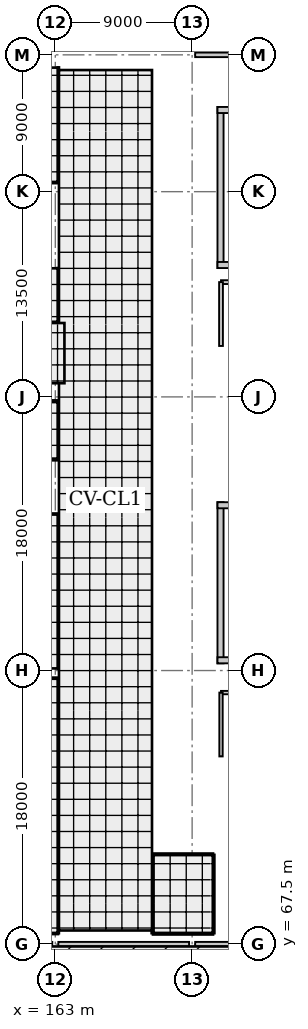
"""IFC4 building model, lengths in metres.
Left out: names, types, materials, properties, quantities, classifications, styles, units other than length and angle.
Written with IfcOpenShell. Run it as: python <this file> out.ifc"""

import sys

from ifc_helpers import new_model, si_unit, direction, frame, frame_2d, origin, origin_2d, place, context, subcontext, project, spatial, rectangle, i_section, extrude, element, fill, save


model = new_model("IFC4")
c1 = context("Model", 3, precision=1e-05, world=origin(), true_north=direction((0.0, 1.0)))
c2 = subcontext(c1, "Body", "Model", "MODEL_VIEW")
j1 = project(units=[si_unit("LENGTHUNIT", "METRE"), si_unit("PLANEANGLEUNIT", "RADIAN")], contexts=[c1])
p1 = place(None, origin())
s1 = spatial("IfcSite", under=j1, at=p1, CompositionType="ELEMENT")
p2 = place(p1, origin())
s2 = spatial("IfcBuilding", under=s1, at=p2, CompositionType="ELEMENT")
p3 = place(p2, frame((0.0, 0.0, 10.8)))
s3 = spatial("IfcBuildingStorey", under=s2, at=p3, CompositionType="ELEMENT", Elevation=10.8)
for number, where, z_axis, x_axis in (
    (1, (163.0, 67.5, 0.0), (0.0, 0.0, 1.0), (1.0, 0.0, 0.0)),
    (2, (163.0, 76.5, 0.0), (0.0, 0.0, 1.0), (1.0, 0.0, 0.0)),
    (3, (163.0, 85.5, 0.0), (0.0, 0.0, 1.0), (1.0, 0.0, 0.0)),
    (4, (163.0, 94.5, 0.0), (0.0, 0.0, 1.0), (1.0, 0.0, 0.0)),
    (5, (163.0, 103.5, 0.0), (0.0, 0.0, 1.0), (1.0, 0.0, 0.0)),
    (6, (163.0, 117.0, 0.0), (0.0, 0.0, 1.0), (1.0, 0.0, 0.0)),
    (7, (163.0, 126.0, 0.0), (0.0, 0.0, 1.0), (1.0, 0.0, 0.0)),
    (8, (172.0, 67.5, 0.0), (0.0, 0.0, 1.0), (1.0, 0.0, 0.0)),
    (9, (172.0, 76.5, 0.0), (0.0, 0.0, 1.0), (1.0, 0.0, 0.0)),
    (10, (172.0, 85.5, 0.0), (0.0, 0.0, 1.0), (1.0, 0.0, 0.0)),
    (11, (172.0, 94.5, 0.0), (0.0, 0.0, 1.0), (1.0, 0.0, 0.0)),
    (12, (172.0, 103.5, 0.0), (0.0, 0.0, 1.0), (1.0, 0.0, 0.0)),
    (13, (172.0, 117.0, 0.0), (0.0, 0.0, 1.0), (1.0, 0.0, 0.0)),
    (14, (172.0, 126.0, 0.0), (0.0, 0.0, 1.0), (1.0, 0.0, 0.0)),
):
    element("IfcColumn", number, at=place(p3, frame(where, z_axis=z_axis, x_axis=x_axis)), inside=s3, PredefinedType="COLUMN", context=c2, shape_type="SweptSolid", body=[
        extrude(i_section(OverallWidth=0.4, OverallDepth=0.408, WebThickness=0.021, FlangeThickness=0.021, FilletRadius=0.022, at=origin_2d()), origin(), (0.0, 0.0, 1.0), 3.6),
    ])
p4 = place(p3, frame((179.8, 67.5, 0.0), z_axis=(0.0, 0.0, 1.0), x_axis=(-1.0, 0.0, 0.0)))
e15 = element("IfcWall", 15, at=p4, inside=s3, PredefinedType="SOLIDWALL", context=c2, shape_type="SweptSolid", body=[
    extrude(rectangle(XDim=7.6, YDim=0.3, at=frame_2d((3.8, 0.0))), origin(), (0.0, 0.0, 1.0), 2.915),
])
p5 = place(p4, frame((2.9, 0.0, 0.9)))
e16 = element("IfcOpeningElement", 16, at=p5, cuts=e15, PredefinedType="OPENING", context=c2, shape_type="SweptSolid", body=[
    extrude(rectangle(XDim=1.8, YDim=1.6, at=frame_2d((0.9, 0.8))), frame((0.0, 0.16, 0.0), z_axis=(0.0, -1.0, 0.0), x_axis=(1.0, 0.0, 0.0)), (0.0, 0.0, 1.0), 0.32),
])
p6 = place(p3, frame((171.8, 67.5, 0.0), z_axis=(0.0, 0.0, 1.0), x_axis=(-1.0, 0.0, 0.0)))
e17 = element("IfcWall", 17, at=p6, inside=s3, PredefinedType="SOLIDWALL", context=c2, shape_type="SweptSolid", body=[
    extrude(rectangle(XDim=8.6, YDim=0.3, at=frame_2d((4.3, 0.0))), origin(), (0.0, 0.0, 1.0), 2.915),
])
p7 = place(p6, frame((1.515, 0.0, 0.9)))
e18 = element("IfcOpeningElement", 18, at=p7, cuts=e17, PredefinedType="OPENING", context=c2, shape_type="SweptSolid", body=[
    extrude(rectangle(XDim=1.5, YDim=1.6, at=frame_2d((0.75, 0.8))), frame((0.0, 0.16, 0.0), z_axis=(0.0, -1.0, 0.0), x_axis=(1.0, 0.0, 0.0)), (0.0, 0.0, 1.0), 0.32),
])
p8 = place(p6, frame((5.735, 0.0, 0.9)))
e19 = element("IfcOpeningElement", 19, at=p8, cuts=e17, PredefinedType="OPENING", context=c2, shape_type="SweptSolid", body=[
    extrude(rectangle(XDim=1.2, YDim=1.6, at=frame_2d((0.6, 0.8))), frame((0.0, 0.16, 0.0), z_axis=(0.0, -1.0, 0.0), x_axis=(1.0, 0.0, 0.0)), (0.0, 0.0, 1.0), 0.32),
])
p9 = place(p3, frame((172.2, 126.0, 0.0), z_axis=(0.0, 0.0, 1.0), x_axis=(1.0, 0.0, 0.0)))
e20 = element("IfcWall", 20, at=p9, inside=s3, PredefinedType="SOLIDWALL", context=c2, shape_type="SweptSolid", body=[
    extrude(rectangle(XDim=7.6, YDim=0.3, at=frame_2d((3.8, 0.0))), origin(), (0.0, 0.0, 1.0), 2.895),
])
p10 = place(p9, frame((3.2, 0.0, 0.9)))
e21 = element("IfcOpeningElement", 21, at=p10, cuts=e20, PredefinedType="OPENING", context=c2, shape_type="SweptSolid", body=[
    extrude(rectangle(XDim=1.2, YDim=1.4, at=frame_2d((0.6, 0.7))), frame((0.0, 0.16, 0.0), z_axis=(0.0, -1.0, 0.0), x_axis=(1.0, 0.0, 0.0)), (0.0, 0.0, 1.0), 0.32),
])
p11 = place(p3, frame((173.867, 96.573, 0.0), z_axis=(0.0, 0.0, 1.0), x_axis=(0.0, -1.0, 0.0)))
e22 = element("IfcWall", 22, at=p11, inside=s3, PredefinedType="SHEAR", context=c2, shape_type="SweptSolid", body=[
    extrude(rectangle(XDim=10.597, YDim=0.4, at=frame_2d((5.299, 0.0))), origin(), (0.0, 0.0, 1.0), 3.38),
])
p12 = place(p3, frame((178.087, 96.373, 0.0), z_axis=(0.0, 0.0, 1.0), x_axis=(-1.0, 0.0, 0.0)))
e23 = element("IfcWall", 23, at=p12, inside=s3, PredefinedType="SHEAR", context=c2, shape_type="SweptSolid", body=[
    extrude(rectangle(XDim=4.42, YDim=0.4, at=frame_2d((2.21, 0.0))), origin(), (0.0, 0.0, 1.0), 3.38),
])
p13 = place(p3, frame((173.667, 86.175, 0.0), z_axis=(0.0, 0.0, 1.0), x_axis=(1.0, 0.0, 0.0)))
e24 = element("IfcWall", 24, at=p13, inside=s3, PredefinedType="SHEAR", context=c2, shape_type="SweptSolid", body=[
    extrude(rectangle(XDim=4.42, YDim=0.4, at=frame_2d((2.21, 0.0))), origin(), (0.0, 0.0, 1.0), 3.38),
])
p14 = place(p13, frame((1.15, 0.0, 0.0)))
e25 = element("IfcOpeningElement", 25, at=p14, cuts=e24, PredefinedType="OPENING", context=c2, shape_type="SweptSolid", body=[
    extrude(rectangle(XDim=1.3, YDim=2.1, at=frame_2d((0.65, 1.05))), frame((0.0, 0.21, 0.0), z_axis=(0.0, -1.0, 0.0), x_axis=(1.0, 0.0, 0.0)), (0.0, 0.0, 1.0), 0.42),
])
p15 = place(p3, frame((173.867, 122.573, 0.0), z_axis=(0.0, 0.0, 1.0), x_axis=(0.0, -1.0, 0.0)))
e26 = element("IfcWall", 26, at=p15, inside=s3, PredefinedType="SHEAR", context=c2, shape_type="SweptSolid", body=[
    extrude(rectangle(XDim=10.597, YDim=0.4, at=frame_2d((5.299, 0.0))), origin(), (0.0, 0.0, 1.0), 3.38),
])
p16 = place(p3, frame((178.087, 122.373, 0.0), z_axis=(0.0, 0.0, 1.0), x_axis=(-1.0, 0.0, 0.0)))
e27 = element("IfcWall", 27, at=p16, inside=s3, PredefinedType="SHEAR", context=c2, shape_type="SweptSolid", body=[
    extrude(rectangle(XDim=4.42, YDim=0.4, at=frame_2d((2.21, 0.0))), origin(), (0.0, 0.0, 1.0), 3.38),
])
p17 = place(p3, frame((173.667, 112.175, 0.0), z_axis=(0.0, 0.0, 1.0), x_axis=(1.0, 0.0, 0.0)))
e28 = element("IfcWall", 28, at=p17, inside=s3, PredefinedType="SHEAR", context=c2, shape_type="SweptSolid", body=[
    extrude(rectangle(XDim=4.42, YDim=0.4, at=frame_2d((2.21, 0.0))), origin(), (0.0, 0.0, 1.0), 3.38),
])
p18 = place(p17, frame((1.15, 0.0, 0.0)))
e29 = element("IfcOpeningElement", 29, at=p18, cuts=e28, PredefinedType="OPENING", context=c2, shape_type="SweptSolid", body=[
    extrude(rectangle(XDim=1.3, YDim=2.1, at=frame_2d((0.65, 1.05))), frame((0.0, 0.21, 0.0), z_axis=(0.0, -1.0, 0.0), x_axis=(1.0, 0.0, 0.0)), (0.0, 0.0, 1.0), 0.42),
])
for number, where, z_axis, x_axis in (
    (30, (163.2, 68.2, 0.0), (0.0, 0.0, 1.0), (-1.0, 0.0, 0.0)),
    (31, (145.6, 85.0, 0.0), (0.0, 0.0, 1.0), (1.0, 0.0, 0.0)),
):
    element("IfcWall", number, at=place(p3, frame(where, z_axis=z_axis, x_axis=x_axis)), inside=s3, PredefinedType="PARTITIONING", context=c2, shape_type="SweptSolid", body=[
        extrude(rectangle(XDim=17.6, YDim=0.12, at=frame_2d((8.8, 0.0))), origin(), (0.0, 0.0, 1.0), 2.915),
    ])
p19 = place(p3, frame((163.2, 85.0, 0.0), z_axis=(0.0, 0.0, 1.0), x_axis=(0.0, -1.0, 0.0)))
e32 = element("IfcWall", 32, at=p19, inside=s3, PredefinedType="PARTITIONING", context=c2, shape_type="SweptSolid", body=[
    extrude(rectangle(XDim=16.8, YDim=0.12, at=frame_2d((8.4, 0.0))), origin(), (0.0, 0.0, 1.0), 2.915),
])
p20 = place(p19, frame((9.375, 0.0, 0.0)))
e33 = element("IfcOpeningElement", 33, at=p20, cuts=e32, PredefinedType="OPENING", context=c2, shape_type="SweptSolid", body=[
    extrude(rectangle(XDim=1.25, YDim=2.1, at=frame_2d((0.625, 1.05))), frame((0.0, 0.07, 0.0), z_axis=(0.0, -1.0, 0.0), x_axis=(1.0, 0.0, 0.0)), (0.0, 0.0, 1.0), 0.14),
])
p21 = place(p3, frame((145.6, 95.8, 0.0), z_axis=(0.0, 0.0, 1.0), x_axis=(1.0, 0.0, 0.0)))
e34 = element("IfcWall", 34, at=p21, inside=s3, PredefinedType="PARTITIONING", context=c2, shape_type="SweptSolid", body=[
    extrude(rectangle(XDim=17.6, YDim=0.11, at=frame_2d((8.8, 0.0))), origin(), (0.0, 0.0, 1.0), 2.965),
])
p22 = place(p3, frame((163.2, 95.8, 0.0), z_axis=(0.0, 0.0, 1.0), x_axis=(0.0, -1.0, 0.0)))
e35 = element("IfcWall", 35, at=p22, inside=s3, PredefinedType="PARTITIONING", context=c2, shape_type="SweptSolid", body=[
    extrude(rectangle(XDim=10.2, YDim=0.11, at=frame_2d((5.1, 0.0))), origin(), (0.0, 0.0, 1.0), 2.915),
])
p23 = place(p22, frame((4.525, 0.0, 0.0)))
e36 = element("IfcOpeningElement", 36, at=p23, cuts=e35, PredefinedType="OPENING", context=c2, shape_type="SweptSolid", body=[
    extrude(rectangle(XDim=1.15, YDim=2.1, at=frame_2d((0.575, 1.05))), frame((0.0, 0.065, 0.0), z_axis=(0.0, -1.0, 0.0), x_axis=(1.0, 0.0, 0.0)), (0.0, 0.0, 1.0), 0.13),
])
p24 = place(p3, frame((163.2, 99.4, 0.0), z_axis=(0.0, 0.0, 1.0), x_axis=(-1.0, 0.0, 0.0)))
e37 = element("IfcWall", 37, at=p24, inside=s3, PredefinedType="PARTITIONING", context=c2, shape_type="SweptSolid", body=[
    extrude(rectangle(XDim=8.6, YDim=0.19, at=frame_2d((4.3, 0.0))), origin(), (0.0, 0.0, 1.0), 2.965),
])
p25 = place(p24, frame((3.85, 0.0, 0.0)))
e38 = element("IfcOpeningElement", 38, at=p25, cuts=e37, PredefinedType="OPENING", context=c2, shape_type="SweptSolid", body=[
    extrude(rectangle(XDim=0.9, YDim=2.1, at=frame_2d((0.45, 1.05))), frame((0.0, 0.105, 0.0), z_axis=(0.0, -1.0, 0.0), x_axis=(1.0, 0.0, 0.0)), (0.0, 0.0, 1.0), 0.21),
])
p26 = place(p3, frame((154.6, 103.2, 0.0), z_axis=(0.0, 0.0, 1.0), x_axis=(1.0, 0.0, 0.0)))
e39 = element("IfcWall", 39, at=p26, inside=s3, PredefinedType="PARTITIONING", context=c2, shape_type="SweptSolid", body=[
    extrude(rectangle(XDim=8.6, YDim=0.19, at=frame_2d((4.3, 0.0))), origin(), (0.0, 0.0, 1.0), 2.755),
])
p27 = place(p3, frame((163.2, 103.2, 0.0), z_axis=(0.0, 0.0, 1.0), x_axis=(0.0, -1.0, 0.0)))
e40 = element("IfcWall", 40, at=p27, inside=s3, PredefinedType="PARTITIONING", context=c2, shape_type="SweptSolid", body=[
    extrude(rectangle(XDim=3.8, YDim=0.19, at=frame_2d((1.9, 0.0))), origin(), (0.0, 0.0, 1.0), 2.755),
])
p28 = place(p3, frame((173.4, 68.2, 0.0), z_axis=(0.0, 0.0, 1.0), x_axis=(-1.0, 0.0, 0.0)))
e41 = element("IfcWall", 41, at=p28, inside=s3, PredefinedType="PARTITIONING", context=c2, shape_type="SweptSolid", body=[
    extrude(rectangle(XDim=4.0, YDim=0.175, at=frame_2d((2.0, 0.0))), origin(), (0.0, 0.0, 1.0), 2.915),
])
p29 = place(p3, frame((169.4, 73.4, 0.0), z_axis=(0.0, 0.0, 1.0), x_axis=(1.0, 0.0, 0.0)))
e42 = element("IfcWall", 42, at=p29, inside=s3, PredefinedType="PARTITIONING", context=c2, shape_type="SweptSolid", body=[
    extrude(rectangle(XDim=4.0, YDim=0.175, at=frame_2d((2.0, 0.0))), origin(), (0.0, 0.0, 1.0), 2.965),
])
p30 = place(p3, frame((169.4, 68.2, 0.0), z_axis=(0.0, 0.0, 1.0), x_axis=(0.0, 1.0, 0.0)))
e43 = element("IfcWall", 43, at=p30, inside=s3, PredefinedType="PARTITIONING", context=c2, shape_type="SweptSolid", body=[
    extrude(rectangle(XDim=5.2, YDim=0.175, at=frame_2d((2.6, 0.0))), origin(), (0.0, 0.0, 1.0), 2.915),
])
p31 = place(p30, frame((2.09, 0.0, 0.0)))
e44 = element("IfcOpeningElement", 44, at=p31, cuts=e43, PredefinedType="OPENING", context=c2, shape_type="SweptSolid", body=[
    extrude(rectangle(XDim=1.02, YDim=2.05, at=frame_2d((0.51, 1.025))), frame((0.0, 0.097, 0.0), z_axis=(0.0, -1.0, 0.0), x_axis=(1.0, 0.0, 0.0)), (0.0, 0.0, 1.0), 0.195),
])
p32 = place(p3, frame((173.4, 73.4, 0.0), z_axis=(0.0, 0.0, 1.0), x_axis=(0.0, -1.0, 0.0)))
e45 = element("IfcWall", 45, at=p32, inside=s3, PredefinedType="PARTITIONING", context=c2, shape_type="SweptSolid", body=[
    extrude(rectangle(XDim=5.2, YDim=0.175, at=frame_2d((2.6, 0.0))), origin(), (0.0, 0.0, 1.0), 2.915),
])
p33 = place(p3, frame((163.2, 108.4, 0.0), z_axis=(0.0, 0.0, 1.0), x_axis=(-1.0, 0.0, 0.0)))
e46 = element("IfcWall", 46, at=p33, inside=s3, PredefinedType="PARTITIONING", context=c2, shape_type="SweptSolid", body=[
    extrude(rectangle(XDim=16.6, YDim=0.14, at=frame_2d((8.3, 0.0))), origin(), (0.0, 0.0, 1.0), 2.755),
])
p34 = place(p33, frame((7.725, 0.0, 0.0)))
e47 = element("IfcOpeningElement", 47, at=p34, cuts=e46, PredefinedType="OPENING", context=c2, shape_type="SweptSolid", body=[
    extrude(rectangle(XDim=1.15, YDim=2.1, at=frame_2d((0.575, 1.05))), frame((0.0, 0.08, 0.0), z_axis=(0.0, -1.0, 0.0), x_axis=(1.0, 0.0, 0.0)), (0.0, 0.0, 1.0), 0.16),
])
p35 = place(p3, frame((163.2, 112.0, 0.0), z_axis=(0.0, 0.0, 1.0), x_axis=(0.0, -1.0, 0.0)))
e48 = element("IfcWall", 48, at=p35, inside=s3, PredefinedType="PARTITIONING", context=c2, shape_type="SweptSolid", body=[
    extrude(rectangle(XDim=3.6, YDim=0.14, at=frame_2d((1.8, 0.0))), origin(), (0.0, 0.0, 1.0), 2.755),
])
p36 = place(p3, frame((163.2, 117.6, 0.0), z_axis=(0.0, 0.0, 1.0), x_axis=(-1.0, 0.0, 0.0)))
e49 = element("IfcWall", 49, at=p36, inside=s3, PredefinedType="PARTITIONING", context=c2, shape_type="SweptSolid", body=[
    extrude(rectangle(XDim=16.0, YDim=0.13, at=frame_2d((8.0, 0.0))), origin(), (0.0, 0.0, 1.0), 2.755),
])
p37 = place(p3, frame((163.2, 125.2, 0.0), z_axis=(0.0, 0.0, 1.0), x_axis=(0.0, -1.0, 0.0)))
e50 = element("IfcWall", 50, at=p37, inside=s3, PredefinedType="PARTITIONING", context=c2, shape_type="SweptSolid", body=[
    extrude(rectangle(XDim=7.6, YDim=0.13, at=frame_2d((3.8, 0.0))), origin(), (0.0, 0.0, 1.0), 2.755),
])
p38 = place(p37, frame((3.225, 0.0, 0.0)))
e51 = element("IfcOpeningElement", 51, at=p38, cuts=e50, PredefinedType="OPENING", context=c2, shape_type="SweptSolid", body=[
    extrude(rectangle(XDim=1.15, YDim=2.1, at=frame_2d((0.575, 1.05))), frame((0.0, 0.075, 0.0), z_axis=(0.0, -1.0, 0.0), x_axis=(1.0, 0.0, 0.0)), (0.0, 0.0, 1.0), 0.15),
])
p39 = place(p3, frame((173.9, 84.05, 0.0), z_axis=(0.0, 0.0, 1.0), x_axis=(1.0, 0.0, 0.0)))
e52 = element("IfcWall", 52, at=p39, inside=s3, PredefinedType="SOLIDWALL", context=c2, shape_type="SweptSolid", body=[
    extrude(rectangle(XDim=4.0, YDim=0.22, at=frame_2d((2.0, 0.0))), origin(), (0.0, 0.0, 1.0), 3.355),
])
p40 = place(p3, frame((173.9, 79.85, 0.0), z_axis=(0.0, 0.0, 1.0), x_axis=(0.0, 1.0, 0.0)))
e53 = element("IfcWall", 53, at=p40, inside=s3, PredefinedType="SOLIDWALL", context=c2, shape_type="SweptSolid", body=[
    extrude(rectangle(XDim=4.2, YDim=0.22, at=frame_2d((2.1, 0.0))), origin(), (0.0, 0.0, 1.0), 3.355),
])
p41 = place(p40, frame((1.4, 0.0, 0.0)))
e54 = element("IfcOpeningElement", 54, at=p41, cuts=e53, PredefinedType="OPENING", context=c2, shape_type="SweptSolid", body=[
    extrude(rectangle(XDim=1.4, YDim=2.1, at=frame_2d((0.7, 1.05))), frame((0.0, 0.12, 0.0), z_axis=(0.0, -1.0, 0.0), x_axis=(1.0, 0.0, 0.0)), (0.0, 0.0, 1.0), 0.24),
])
p42 = place(p3, frame((173.9, 111.05, 0.0), z_axis=(0.0, 0.0, 1.0), x_axis=(1.0, 0.0, 0.0)))
e55 = element("IfcWall", 55, at=p42, inside=s3, PredefinedType="SOLIDWALL", context=c2, shape_type="SweptSolid", body=[
    extrude(rectangle(XDim=4.0, YDim=0.25, at=frame_2d((2.0, 0.0))), origin(), (0.0, 0.0, 1.0), 3.355),
])
p43 = place(p3, frame((173.9, 106.85, 0.0), z_axis=(0.0, 0.0, 1.0), x_axis=(0.0, 1.0, 0.0)))
e56 = element("IfcWall", 56, at=p43, inside=s3, PredefinedType="SOLIDWALL", context=c2, shape_type="SweptSolid", body=[
    extrude(rectangle(XDim=4.2, YDim=0.25, at=frame_2d((2.1, 0.0))), origin(), (0.0, 0.0, 1.0), 3.355),
])
p44 = place(p43, frame((1.4, 0.0, 0.0)))
e57 = element("IfcOpeningElement", 57, at=p44, cuts=e56, PredefinedType="OPENING", context=c2, shape_type="SweptSolid", body=[
    extrude(rectangle(XDim=1.4, YDim=2.1, at=frame_2d((0.7, 1.05))), frame((0.0, 0.135, 0.0), z_axis=(0.0, -1.0, 0.0), x_axis=(1.0, 0.0, 0.0)), (0.0, 0.0, 1.0), 0.27),
])
p45 = place(p7, origin())
e58 = element("IfcWindow", 58, at=p45, inside=s3, PartitioningType="SINGLE_PANEL", PredefinedType="WINDOW", context=c2, shape_type="SweptSolid", body=[
    extrude(rectangle(XDim=1.5, YDim=1.6, at=frame_2d((0.75, 0.8))), frame((0.0, 0.03, 0.0), z_axis=(0.0, -1.0, 0.0), x_axis=(1.0, 0.0, 0.0)), (0.0, 0.0, 1.0), 0.06),
])
fill(e18, e58)
p46 = place(p8, origin())
e59 = element("IfcWindow", 59, at=p46, inside=s3, PartitioningType="SINGLE_PANEL", PredefinedType="WINDOW", context=c2, shape_type="SweptSolid", body=[
    extrude(rectangle(XDim=1.2, YDim=1.6, at=frame_2d((0.6, 0.8))), frame((0.0, 0.03, 0.0), z_axis=(0.0, -1.0, 0.0), x_axis=(1.0, 0.0, 0.0)), (0.0, 0.0, 1.0), 0.06),
])
fill(e19, e59)
p47 = place(p20, origin())
e60 = element("IfcDoor", 60, at=p47, inside=s3, OperationType="SINGLE_SWING_LEFT", PredefinedType="DOOR", context=c2, shape_type="SweptSolid", body=[
    extrude(rectangle(XDim=1.25, YDim=2.1, at=frame_2d((0.625, 1.05))), frame((0.0, 0.025, 0.0), z_axis=(0.0, -1.0, 0.0), x_axis=(1.0, 0.0, 0.0)), (0.0, 0.0, 1.0), 0.05),
])
fill(e33, e60)
p48 = place(p23, origin())
e61 = element("IfcDoor", 61, at=p48, inside=s3, OperationType="SINGLE_SWING_RIGHT", PredefinedType="DOOR", context=c2, shape_type="SweptSolid", body=[
    extrude(rectangle(XDim=1.15, YDim=2.1, at=frame_2d((0.575, 1.05))), frame((0.0, 0.025, 0.0), z_axis=(0.0, -1.0, 0.0), x_axis=(1.0, 0.0, 0.0)), (0.0, 0.0, 1.0), 0.05),
])
fill(e36, e61)
p49 = place(p31, origin())
e62 = element("IfcDoor", 62, at=p49, inside=s3, OperationType="SINGLE_SWING_LEFT", PredefinedType="DOOR", context=c2, shape_type="SweptSolid", body=[
    extrude(rectangle(XDim=1.02, YDim=2.05, at=frame_2d((0.51, 1.025))), frame((0.0, 0.025, 0.0), z_axis=(0.0, -1.0, 0.0), x_axis=(1.0, 0.0, 0.0)), (0.0, 0.0, 1.0), 0.05),
])
fill(e44, e62)
p50 = place(p38, origin())
e63 = element("IfcDoor", 63, at=p50, inside=s3, OperationType="SINGLE_SWING_LEFT", PredefinedType="DOOR", context=c2, shape_type="SweptSolid", body=[
    extrude(rectangle(XDim=1.15, YDim=2.1, at=frame_2d((0.575, 1.05))), frame((0.0, 0.025, 0.0), z_axis=(0.0, -1.0, 0.0), x_axis=(1.0, 0.0, 0.0)), (0.0, 0.0, 1.0), 0.05),
])
fill(e51, e63)
p51 = place(p41, origin())
e64 = element("IfcDoor", 64, at=p51, inside=s3, OperationType="SINGLE_SWING_LEFT", PredefinedType="DOOR", context=c2, shape_type="SweptSolid", body=[
    extrude(rectangle(XDim=1.4, YDim=2.1, at=frame_2d((0.7, 1.05))), frame((0.0, 0.025, 0.0), z_axis=(0.0, -1.0, 0.0), x_axis=(1.0, 0.0, 0.0)), (0.0, 0.0, 1.0), 0.05),
])
fill(e54, e64)
p52 = place(p44, origin())
e65 = element("IfcDoor", 65, at=p52, inside=s3, OperationType="SINGLE_SWING_RIGHT", PredefinedType="DOOR", context=c2, shape_type="SweptSolid", body=[
    extrude(rectangle(XDim=1.4, YDim=2.1, at=frame_2d((0.7, 1.05))), frame((0.0, 0.025, 0.0), z_axis=(0.0, -1.0, 0.0), x_axis=(1.0, 0.0, 0.0)), (0.0, 0.0, 1.0), 0.05),
])
fill(e57, e65)
save(model, sys.argv[1])
